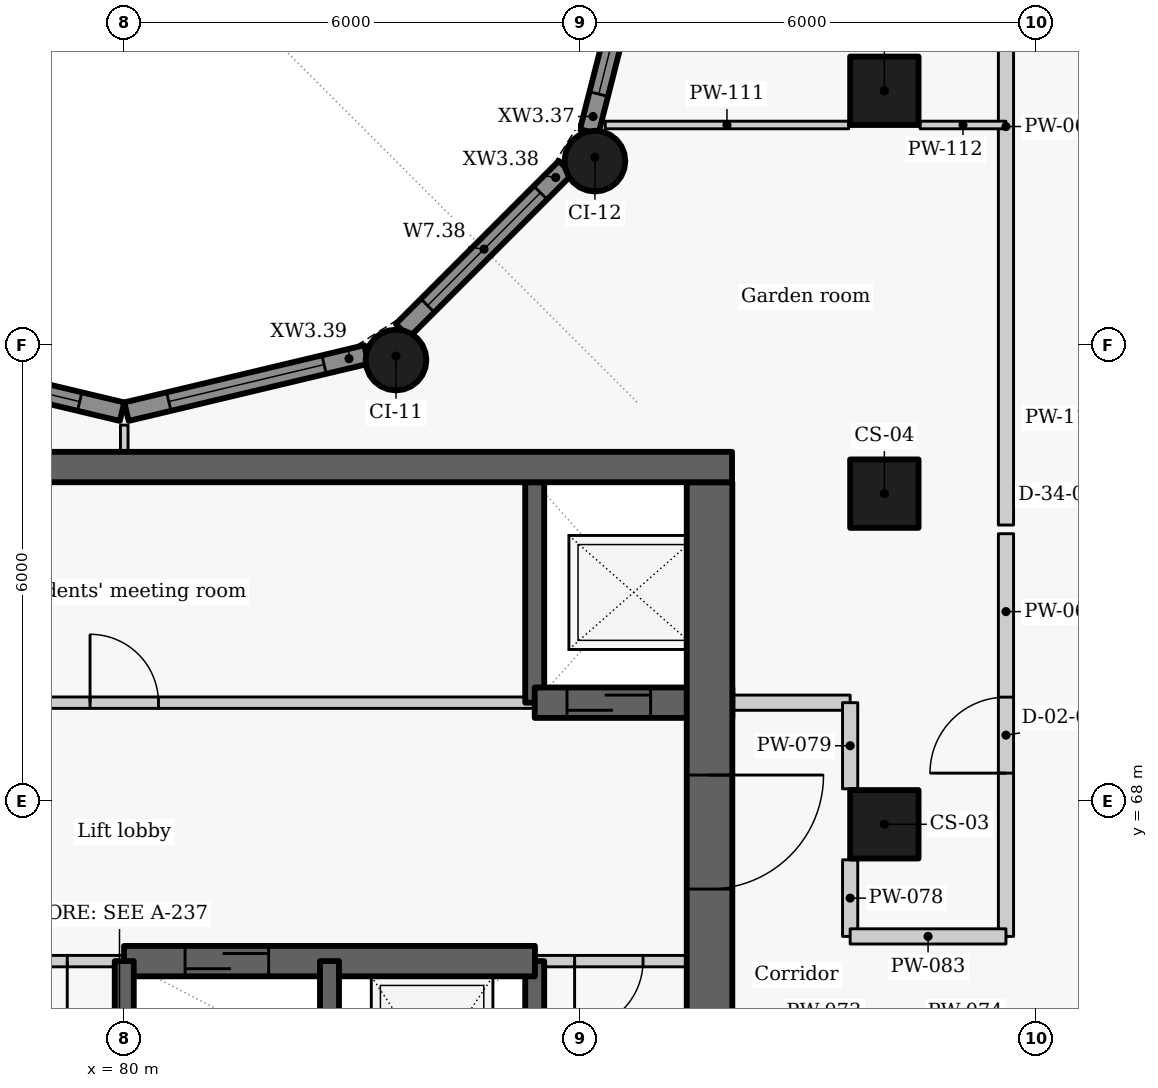
"""IFC4 building model, lengths in metres.
Left out: names, types, materials, properties, quantities, classifications, styles, units other than length and angle.
Written with IfcOpenShell. Run it as: python <this file> out.ifc"""

import sys

from ifc_helpers import new_model, si_unit, direction, frame, frame_2d, origin, origin_2d, place, context, subcontext, project, spatial, rectangle, circle, extrude, element, fill, save


model = new_model("IFC4")
c1 = context("Model", 3, precision=1e-05, world=origin(), true_north=direction((0.0, 1.0)))
c2 = subcontext(c1, "Body", "Model", "MODEL_VIEW")
j1 = project(units=[si_unit("LENGTHUNIT", "METRE"), si_unit("PLANEANGLEUNIT", "RADIAN")], contexts=[c1])
p1 = place(None, origin())
s1 = spatial("IfcSite", under=j1, at=p1, CompositionType="ELEMENT")
p2 = place(p1, origin())
s2 = spatial("IfcBuilding", under=s1, at=p2, CompositionType="ELEMENT")
p3 = place(p2, frame((0.0, 0.0, 216.3)))
s3 = spatial("IfcBuildingStorey", under=s2, at=p3, CompositionType="ELEMENT", Elevation=216.3)
for number, where, z_axis, x_axis in (
    (1, (90.0, 67.7, 0.0), (0.0, 0.0, 1.0), (0.0, 1.0, 0.0)),
    (2, (90.0, 72.05, 0.0), (0.0, 0.0, 1.0), (0.0, 1.0, 0.0)),
    (3, (90.0, 77.35, 0.0), (0.0, 0.0, 1.0), (0.0, 1.0, 0.0)),
):
    element("IfcColumn", number, at=place(p3, frame(where, z_axis=z_axis, x_axis=x_axis)), inside=s3, PredefinedType="COLUMN", context=c2, shape_type="SweptSolid", body=[
        extrude(rectangle(XDim=0.9, YDim=0.9, at=origin_2d()), origin(), (0.0, 0.0, 1.0), 3.3),
    ])
for number, where, z_axis, x_axis in (
    (4, (83.575, 73.808, 0.0), (0.0, 0.0, 1.0), (0.866, 0.5, 0.0)),
    (5, (86.192, 76.425, 0.0), (0.0, 0.0, 1.0), (0.5, 0.866, 0.0)),
):
    element("IfcColumn", number, at=place(p3, frame(where, z_axis=z_axis, x_axis=x_axis)), inside=s3, PredefinedType="COLUMN", context=c2, shape_type="SweptSolid", body=[
        extrude(circle(Radius=0.4, at=origin_2d()), origin(), (0.0, 0.0, 1.0), 3.3),
    ])
p4 = place(p3, frame((86.86, 79.73, 0.0), z_axis=(0.0, 0.0, 1.0), x_axis=(-0.247055971283, -0.969001211069, 0.0)))
e6 = element("IfcWall", 6, at=p4, inside=s3, PredefinedType="SOLIDWALL", context=c2, shape_type="SweptSolid", body=[
    extrude(rectangle(XDim=3.01, YDim=0.25, at=frame_2d((1.505, 0.0))), origin(), (0.0, 0.0, 1.0), 2.05),
])
p5 = place(p4, frame((0.401, 0.0, 0.9)))
e7 = element("IfcOpeningElement", 7, at=p5, cuts=e6, PredefinedType="OPENING", context=c2, shape_type="SweptSolid", body=[
    extrude(rectangle(XDim=2.1, YDim=1.1, at=frame_2d((1.05, 0.55))), frame((0.0, 0.135, 0.0), z_axis=(0.0, -1.0, 0.0), x_axis=(1.0, 0.0, 0.0)), (0.0, 0.0, 1.0), 0.27),
])
p6 = place(p3, frame((85.806, 76.339, 0.0), z_axis=(0.0, 0.0, 1.0), x_axis=(-0.707106781187, -0.707106781187, 0.0)))
e8 = element("IfcWall", 8, at=p6, inside=s3, PredefinedType="SOLIDWALL", context=c2, shape_type="SweptSolid", body=[
    extrude(rectangle(XDim=3.033, YDim=0.25, at=frame_2d((1.517, 0.0))), origin(), (0.0, 0.0, 1.0), 2.05),
])
p7 = place(p6, frame((0.467, 0.0, 0.9)))
e9 = element("IfcOpeningElement", 9, at=p7, cuts=e8, PredefinedType="OPENING", context=c2, shape_type="SweptSolid", body=[
    extrude(rectangle(XDim=2.1, YDim=1.1, at=frame_2d((1.05, 0.55))), frame((0.0, 0.135, 0.0), z_axis=(0.0, -1.0, 0.0), x_axis=(1.0, 0.0, 0.0)), (0.0, 0.0, 1.0), 0.27),
])
p8 = place(p3, frame((83.186, 73.881, 0.0), z_axis=(0.0, 0.0, 1.0), x_axis=(-0.972773113459, -0.231759508395, 0.0)))
e10 = element("IfcWall", 10, at=p8, inside=s3, PredefinedType="SOLIDWALL", context=c2, shape_type="SweptSolid", body=[
    extrude(rectangle(XDim=3.246, YDim=0.25, at=frame_2d((1.623, 0.0))), origin(), (0.0, 0.0, 1.0), 2.05),
])
p9 = place(p8, frame((0.573, 0.0, 0.9)))
e11 = element("IfcOpeningElement", 11, at=p9, cuts=e10, PredefinedType="OPENING", context=c2, shape_type="SweptSolid", body=[
    extrude(rectangle(XDim=2.1, YDim=1.1, at=frame_2d((1.05, 0.55))), frame((0.0, 0.135, 0.0), z_axis=(0.0, -1.0, 0.0), x_axis=(1.0, 0.0, 0.0)), (0.0, 0.0, 1.0), 0.27),
])
p10 = place(p3, frame((79.971, 73.128, 0.0), z_axis=(0.0, 0.0, 1.0), x_axis=(-0.972773113459, 0.231759508395, 0.0)))
e12 = element("IfcWall", 12, at=p10, inside=s3, PredefinedType="SOLIDWALL", context=c2, shape_type="SweptSolid", body=[
    extrude(rectangle(XDim=3.246, YDim=0.25, at=frame_2d((1.623, 0.0))), origin(), (0.0, 0.0, 1.0), 2.05),
])
p11 = place(p10, frame((0.573, 0.0, 0.9)))
e13 = element("IfcOpeningElement", 13, at=p11, cuts=e12, PredefinedType="OPENING", context=c2, shape_type="SweptSolid", body=[
    extrude(rectangle(XDim=2.1, YDim=1.1, at=frame_2d((1.05, 0.55))), frame((0.0, 0.135, 0.0), z_axis=(0.0, -1.0, 0.0), x_axis=(1.0, 0.0, 0.0)), (0.0, 0.0, 1.0), 0.27),
])
p12 = place(p3, frame((72.0, 69.3, 0.0), z_axis=(0.0, 0.0, 1.0), x_axis=(1.0, 0.0, 0.0)))
e14 = element("IfcWall", 14, at=p12, inside=s3, PredefinedType="PARTITIONING", context=c2, shape_type="SweptSolid", body=[
    extrude(rectangle(XDim=13.4, YDim=0.15, at=frame_2d((6.7, 0.0))), origin(), (0.0, 0.0, 1.0), 2.95),
])
p13 = place(p12, frame((1.175, 0.0, 0.0)))
e15 = element("IfcOpeningElement", 15, at=p13, cuts=e14, PredefinedType="OPENING", context=c2, shape_type="SweptSolid", body=[
    extrude(rectangle(XDim=0.9, YDim=2.1, at=frame_2d((0.45, 1.05))), frame((0.0, 0.085, 0.0), z_axis=(0.0, -1.0, 0.0), x_axis=(1.0, 0.0, 0.0)), (0.0, 0.0, 1.0), 0.17),
])
p14 = place(p12, frame((7.55, 0.0, 0.0)))
e16 = element("IfcOpeningElement", 16, at=p14, cuts=e14, PredefinedType="OPENING", context=c2, shape_type="SweptSolid", body=[
    extrude(rectangle(XDim=0.9, YDim=2.1, at=frame_2d((0.45, 1.05))), frame((0.0, 0.085, 0.0), z_axis=(0.0, -1.0, 0.0), x_axis=(1.0, 0.0, 0.0)), (0.0, 0.0, 1.0), 0.17),
])
p15 = place(p3, frame((85.4, 63.1, -0.275), z_axis=(0.0, 0.0, 1.0), x_axis=(0.0, 1.0, 0.0)))
e17 = element("IfcWall", 17, at=p15, inside=s3, PredefinedType="SHEAR", context=c2, shape_type="SweptSolid", body=[
    extrude(rectangle(XDim=2.8, YDim=0.25, at=frame_2d((1.4, 0.0))), origin(), (0.0, 0.0, 1.0), 3.225),
])
p16 = place(p3, frame((85.4, 69.3, -0.275), z_axis=(0.0, 0.0, 1.0), x_axis=(0.0, 1.0, 0.0)))
e18 = element("IfcWall", 18, at=p16, inside=s3, PredefinedType="SHEAR", context=c2, shape_type="SweptSolid", body=[
    extrude(rectangle(XDim=2.9, YDim=0.25, at=frame_2d((1.45, 0.0))), origin(), (0.0, 0.0, 1.0), 3.225),
])
p17 = place(p3, frame((85.4, 69.3, -0.275), z_axis=(0.0, 0.0, 1.0), x_axis=(1.0, 0.0, 0.0)))
e19 = element("IfcWall", 19, at=p17, inside=s3, PredefinedType="SHEAR", context=c2, shape_type="SweptSolid", body=[
    extrude(rectangle(XDim=2.6, YDim=0.4, at=frame_2d((1.3, 0.0))), origin(), (0.0, 0.0, 1.0), 3.225),
])
p18 = place(p17, frame((0.425, 0.0, 0.275)))
e20 = element("IfcOpeningElement", 20, at=p18, cuts=e19, PredefinedType="OPENING", context=c2, shape_type="SweptSolid", body=[
    extrude(rectangle(XDim=1.1, YDim=2.1, at=frame_2d((0.55, 1.05))), frame((0.0, 0.21, 0.0), z_axis=(0.0, -1.0, 0.0), x_axis=(1.0, 0.0, 0.0)), (0.0, 0.0, 1.0), 0.42),
])
p19 = place(p3, frame((87.7, 72.2, -0.275), z_axis=(0.0, 0.0, 1.0), x_axis=(0.0, -1.0, 0.0)))
e21 = element("IfcWall", 21, at=p19, inside=s3, PredefinedType="SHEAR", context=c2, shape_type="SweptSolid", body=[
    extrude(rectangle(XDim=14.25, YDim=0.6, at=frame_2d((7.125, 0.0))), origin(), (0.0, 0.0, 1.0), 3.225),
])
p20 = place(p19, frame((3.852, 0.0, 0.275)))
e22 = element("IfcOpeningElement", 22, at=p20, cuts=e21, PredefinedType="OPENING", context=c2, shape_type="SweptSolid", body=[
    extrude(rectangle(XDim=1.5, YDim=2.1, at=frame_2d((0.75, 1.05))), frame((0.0, 0.31, 0.0), z_axis=(0.0, -1.0, 0.0), x_axis=(1.0, 0.0, 0.0)), (0.0, 0.0, 1.0), 0.62),
])
p21 = place(p3, frame((80.003, 65.9, 0.0), z_axis=(0.0, 0.0, 1.0), x_axis=(-1.0, 0.0, 0.0)))
e23 = element("IfcWall", 23, at=p21, inside=s3, PredefinedType="PARTITIONING", context=c2, shape_type="SweptSolid", body=[
    extrude(rectangle(XDim=2.706, YDim=0.15, at=frame_2d((1.353, 0.0))), origin(), (0.0, 0.0, 1.0), 2.95),
])
p22 = place(p21, frame((0.753, 0.0, 0.0)))
e24 = element("IfcOpeningElement", 24, at=p22, cuts=e23, PredefinedType="OPENING", context=c2, shape_type="SweptSolid", body=[
    extrude(rectangle(XDim=1.2, YDim=2.1, at=frame_2d((0.6, 1.05))), frame((0.0, 0.085, 0.0), z_axis=(0.0, -1.0, 0.0), x_axis=(1.0, 0.0, 0.0)), (0.0, 0.0, 1.0), 0.17),
])
p23 = place(p3, frame((88.0, 65.9, 0.0), z_axis=(0.0, 0.0, 1.0), x_axis=(-1.0, 0.0, 0.0)))
e25 = element("IfcWall", 25, at=p23, inside=s3, PredefinedType="PARTITIONING", context=c2, shape_type="SweptSolid", body=[
    extrude(rectangle(XDim=2.603, YDim=0.15, at=frame_2d((1.302, 0.0))), origin(), (0.0, 0.0, 1.0), 2.95),
])
p24 = place(p23, frame((1.175, 0.0, 0.0)))
e26 = element("IfcOpeningElement", 26, at=p24, cuts=e25, PredefinedType="OPENING", context=c2, shape_type="SweptSolid", body=[
    extrude(rectangle(XDim=0.9, YDim=2.1, at=frame_2d((0.45, 1.05))), frame((0.0, 0.085, 0.0), z_axis=(0.0, -1.0, 0.0), x_axis=(1.0, 0.0, 0.0)), (0.0, 0.0, 1.0), 0.17),
])
p25 = place(p3, frame((79.997, 65.9, -0.275), z_axis=(0.0, 0.0, 1.0), x_axis=(1.0, 0.0, 0.0)))
e27 = element("IfcWall", 27, at=p25, inside=s3, PredefinedType="SHEAR", context=c2, shape_type="SweptSolid", body=[
    extrude(rectangle(XDim=5.406, YDim=0.4, at=frame_2d((2.703, 0.0))), origin(), (0.0, 0.0, 1.0), 3.225),
])
p26 = place(p25, frame((0.803, 0.0, 0.275)))
e28 = element("IfcOpeningElement", 28, at=p26, cuts=e27, PredefinedType="OPENING", context=c2, shape_type="SweptSolid", body=[
    extrude(rectangle(XDim=1.1, YDim=2.1, at=frame_2d((0.55, 1.05))), frame((0.0, 0.21, 0.0), z_axis=(0.0, -1.0, 0.0), x_axis=(1.0, 0.0, 0.0)), (0.0, 0.0, 1.0), 0.42),
])
for number, where, z_axis, x_axis in (
    (29, (80.0, 63.1, -0.275), (0.0, 0.0, 1.0), (0.0, 1.0, 0.0)),
    (30, (82.7, 63.1, -0.275), (0.0, 0.0, 1.0), (0.0, 1.0, 0.0)),
):
    element("IfcWall", number, at=place(p3, frame(where, z_axis=z_axis, x_axis=x_axis)), inside=s3, PredefinedType="SHEAR", context=c2, shape_type="SweptSolid", body=[
        extrude(rectangle(XDim=2.8, YDim=0.25, at=frame_2d((1.4, 0.0))), origin(), (0.0, 0.0, 1.0), 3.225),
    ])
p27 = place(p3, frame((91.6, 66.225, 0.0), z_axis=(0.0, 0.0, 1.0), x_axis=(0.0, 1.0, 0.0)))
e31 = element("IfcWall", 31, at=p27, inside=s3, PredefinedType="PARTITIONING", context=c2, shape_type="SweptSolid", body=[
    extrude(rectangle(XDim=5.298, YDim=0.2, at=frame_2d((2.649, 0.0))), origin(), (0.0, 0.0, 1.0), 2.95),
])
p28 = place(p27, frame((2.148, 0.0, 0.0)))
e32 = element("IfcOpeningElement", 32, at=p28, cuts=e31, PredefinedType="OPENING", context=c2, shape_type="SweptSolid", body=[
    extrude(rectangle(XDim=1.0, YDim=2.1, at=frame_2d((0.5, 1.05))), frame((0.0, 0.11, 0.0), z_axis=(0.0, -1.0, 0.0), x_axis=(1.0, 0.0, 0.0)), (0.0, 0.0, 1.0), 0.22),
])
p29 = place(p3, frame((91.6, 71.637, 0.0), z_axis=(0.0, 0.0, 1.0), x_axis=(0.0, 1.0, 0.0)))
e33 = element("IfcWall", 33, at=p29, inside=s3, PredefinedType="PARTITIONING", context=c2, shape_type="SweptSolid", body=[
    extrude(rectangle(XDim=10.486, YDim=0.2, at=frame_2d((5.243, 0.0))), origin(), (0.0, 0.0, 1.0), 2.95),
])
p30 = place(p3, frame((88.0, 69.3, 0.0), z_axis=(0.0, 0.0, 1.0), x_axis=(1.0, 0.0, 0.0)))
e34 = element("IfcWall", 34, at=p30, inside=s3, PredefinedType="PARTITIONING", context=c2, shape_type="SweptSolid", body=[
    extrude(rectangle(XDim=1.55, YDim=0.2, at=frame_2d((0.775, 0.0))), origin(), (0.0, 0.0, 1.0), 2.95),
])
p31 = place(p3, frame((89.55, 66.225, 0.0), z_axis=(0.0, 0.0, 1.0), x_axis=(0.0, 1.0, 0.0)))
e35 = element("IfcWall", 35, at=p31, inside=s3, PredefinedType="PARTITIONING", context=c2, shape_type="SweptSolid", body=[
    extrude(rectangle(XDim=1.008, YDim=0.2, at=frame_2d((0.504, 0.0))), origin(), (0.0, 0.0, 1.0), 2.43),
])
p32 = place(p3, frame((89.55, 68.167, 0.0), z_axis=(0.0, 0.0, 1.0), x_axis=(0.0, 1.0, 0.0)))
e36 = element("IfcWall", 36, at=p32, inside=s3, PredefinedType="PARTITIONING", context=c2, shape_type="SweptSolid", body=[
    extrude(rectangle(XDim=1.133, YDim=0.2, at=frame_2d((0.566, 0.0))), origin(), (0.0, 0.0, 1.0), 2.43),
])
p33 = place(p3, frame((89.55, 66.225, 0.0), z_axis=(0.0, 0.0, 1.0), x_axis=(1.0, 0.0, 0.0)))
e37 = element("IfcWall", 37, at=p33, inside=s3, PredefinedType="PARTITIONING", context=c2, shape_type="SweptSolid", body=[
    extrude(rectangle(XDim=2.05, YDim=0.2, at=frame_2d((1.025, 0.0))), origin(), (0.0, 0.0, 1.0), 2.43),
])
p34 = place(p3, frame((80.0, 72.6, 0.0), z_axis=(0.0, 0.0, 1.0), x_axis=(0.0, 1.0, 0.0)))
e38 = element("IfcWall", 38, at=p34, inside=s3, PredefinedType="PARTITIONING", context=c2, shape_type="SweptSolid", body=[
    extrude(rectangle(XDim=0.352, YDim=0.1, at=frame_2d((0.176, 0.0))), origin(), (0.0, 0.0, 1.0), 2.95),
])
p35 = place(p3, frame((86.328, 76.9, 0.0), z_axis=(0.0, 0.0, 1.0), x_axis=(1.0, 0.0, 0.0)))
e39 = element("IfcWall", 39, at=p35, inside=s3, PredefinedType="PARTITIONING", context=c2, shape_type="SweptSolid", body=[
    extrude(rectangle(XDim=3.202, YDim=0.1, at=frame_2d((1.601, 0.0))), origin(), (0.0, 0.0, 1.0), 2.95),
])
p36 = place(p3, frame((90.47, 76.9, 0.0), z_axis=(0.0, 0.0, 1.0), x_axis=(1.0, 0.0, 0.0)))
e40 = element("IfcWall", 40, at=p36, inside=s3, PredefinedType="PARTITIONING", context=c2, shape_type="SweptSolid", body=[
    extrude(rectangle(XDim=1.129, YDim=0.1, at=frame_2d((0.564, 0.0))), origin(), (0.0, 0.0, 1.0), 2.95),
])
p37 = place(p3, frame((72.004, 72.4, -0.275), z_axis=(0.0, 0.0, 1.0), x_axis=(1.0, 0.0, 0.0)))
e41 = element("IfcWall", 41, at=p37, inside=s3, PredefinedType="SHEAR", context=c2, shape_type="SweptSolid", body=[
    extrude(rectangle(XDim=15.992, YDim=0.4, at=frame_2d((7.996, 0.0))), origin(), (0.0, 0.0, 1.0), 3.225),
])
p38 = place(p5, origin())
e42 = element("IfcWindow", 42, at=p38, inside=s3, PartitioningType="SINGLE_PANEL", PredefinedType="WINDOW", context=c2, shape_type="SweptSolid", body=[
    extrude(rectangle(XDim=2.1, YDim=1.1, at=frame_2d((1.05, 0.55))), frame((0.0, 0.03, 0.0), z_axis=(0.0, -1.0, 0.0), x_axis=(1.0, 0.0, 0.0)), (0.0, 0.0, 1.0), 0.06),
])
fill(e7, e42)
p39 = place(p7, origin())
e43 = element("IfcWindow", 43, at=p39, inside=s3, PartitioningType="SINGLE_PANEL", PredefinedType="WINDOW", context=c2, shape_type="SweptSolid", body=[
    extrude(rectangle(XDim=2.1, YDim=1.1, at=frame_2d((1.05, 0.55))), frame((0.0, 0.03, 0.0), z_axis=(0.0, -1.0, 0.0), x_axis=(1.0, 0.0, 0.0)), (0.0, 0.0, 1.0), 0.06),
])
fill(e9, e43)
p40 = place(p9, origin())
e44 = element("IfcWindow", 44, at=p40, inside=s3, PartitioningType="SINGLE_PANEL", PredefinedType="WINDOW", context=c2, shape_type="SweptSolid", body=[
    extrude(rectangle(XDim=2.1, YDim=1.1, at=frame_2d((1.05, 0.55))), frame((0.0, 0.03, 0.0), z_axis=(0.0, -1.0, 0.0), x_axis=(1.0, 0.0, 0.0)), (0.0, 0.0, 1.0), 0.06),
])
fill(e11, e44)
p41 = place(p11, origin())
e45 = element("IfcWindow", 45, at=p41, inside=s3, PartitioningType="SINGLE_PANEL", PredefinedType="WINDOW", context=c2, shape_type="SweptSolid", body=[
    extrude(rectangle(XDim=2.1, YDim=1.1, at=frame_2d((1.05, 0.55))), frame((0.0, 0.03, 0.0), z_axis=(0.0, -1.0, 0.0), x_axis=(1.0, 0.0, 0.0)), (0.0, 0.0, 1.0), 0.06),
])
fill(e13, e45)
p42 = place(p18, origin())
e46 = element("IfcDoor", 46, at=p42, inside=s3, OperationType="SLIDING_TO_LEFT", PredefinedType="DOOR", context=c2, shape_type="SweptSolid", body=[
    extrude(rectangle(XDim=1.1, YDim=2.1, at=frame_2d((0.55, 1.05))), frame((0.0, 0.025, 0.0), z_axis=(0.0, -1.0, 0.0), x_axis=(1.0, 0.0, 0.0)), (0.0, 0.0, 1.0), 0.05),
])
fill(e20, e46)
p43 = place(p14, origin())
e47 = element("IfcDoor", 47, at=p43, inside=s3, OperationType="SINGLE_SWING_LEFT", PredefinedType="DOOR", context=c2, shape_type="SweptSolid", body=[
    extrude(rectangle(XDim=0.9, YDim=2.1, at=frame_2d((0.45, 1.05))), frame((0.0, 0.025, 0.0), z_axis=(0.0, -1.0, 0.0), x_axis=(1.0, 0.0, 0.0)), (0.0, 0.0, 1.0), 0.05),
])
fill(e16, e47)
p44 = place(p22, origin())
e48 = element("IfcDoor", 48, at=p44, inside=s3, OperationType="DOUBLE_DOOR_SINGLE_SWING", PredefinedType="DOOR", context=c2, shape_type="SweptSolid", body=[
    extrude(rectangle(XDim=1.2, YDim=2.1, at=frame_2d((0.6, 1.05))), frame((0.0, 0.025, 0.0), z_axis=(0.0, -1.0, 0.0), x_axis=(1.0, 0.0, 0.0)), (0.0, 0.0, 1.0), 0.05),
])
fill(e24, e48)
p45 = place(p26, origin())
e49 = element("IfcDoor", 49, at=p45, inside=s3, OperationType="SLIDING_TO_LEFT", PredefinedType="DOOR", context=c2, shape_type="SweptSolid", body=[
    extrude(rectangle(XDim=1.1, YDim=2.1, at=frame_2d((0.55, 1.05))), frame((0.0, 0.025, 0.0), z_axis=(0.0, -1.0, 0.0), x_axis=(1.0, 0.0, 0.0)), (0.0, 0.0, 1.0), 0.05),
])
fill(e28, e49)
p46 = place(p24, origin())
e50 = element("IfcDoor", 50, at=p46, inside=s3, OperationType="SINGLE_SWING_RIGHT", PredefinedType="DOOR", context=c2, shape_type="SweptSolid", body=[
    extrude(rectangle(XDim=0.9, YDim=2.1, at=frame_2d((0.45, 1.05))), frame((0.0, 0.025, 0.0), z_axis=(0.0, -1.0, 0.0), x_axis=(1.0, 0.0, 0.0)), (0.0, 0.0, 1.0), 0.05),
])
fill(e26, e50)
p47 = place(p28, origin())
e51 = element("IfcDoor", 51, at=p47, inside=s3, OperationType="SINGLE_SWING_LEFT", PredefinedType="DOOR", context=c2, shape_type="SweptSolid", body=[
    extrude(rectangle(XDim=1.0, YDim=2.1, at=frame_2d((0.5, 1.05))), frame((0.0, 0.025, 0.0), z_axis=(0.0, -1.0, 0.0), x_axis=(1.0, 0.0, 0.0)), (0.0, 0.0, 1.0), 0.05),
])
fill(e32, e51)
p48 = place(p20, origin())
e52 = element("IfcDoor", 52, at=p48, inside=s3, OperationType="DOUBLE_DOOR_SINGLE_SWING", PredefinedType="DOOR", context=c2, shape_type="SweptSolid", body=[
    extrude(rectangle(XDim=1.5, YDim=2.1, at=frame_2d((0.75, 1.05))), frame((0.0, 0.025, 0.0), z_axis=(0.0, -1.0, 0.0), x_axis=(1.0, 0.0, 0.0)), (0.0, 0.0, 1.0), 0.05),
])
fill(e22, e52)
save(model, sys.argv[1])
